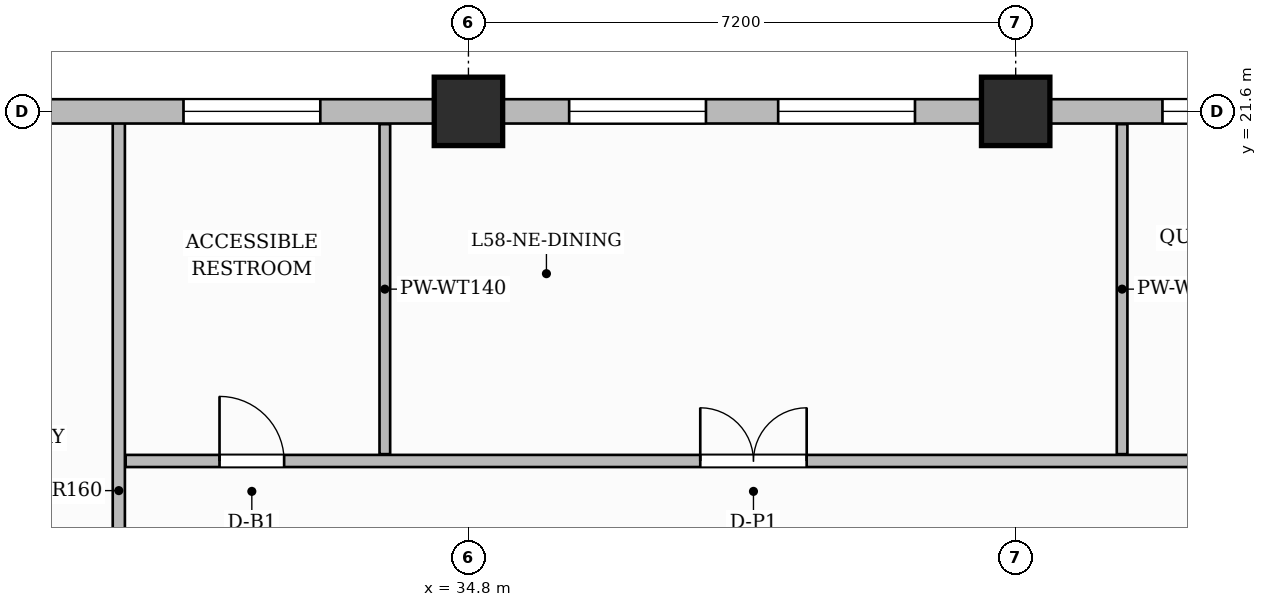
"""IFC4 building model, lengths in metres.
Left out: names, types, materials, properties, quantities, classifications, styles, units other than length and angle.
Written with IfcOpenShell. Run it as: python <this file> out.ifc"""

import sys

from ifc_helpers import new_model, si_unit, direction, frame, frame_2d, origin, origin_2d, place, context, subcontext, project, spatial, rectangle, extrude, source, transform, mapped, element, fill, save


model = new_model("IFC4")
c1 = context("Model", 3, precision=1e-05, world=origin(), true_north=direction((0.0, 1.0)))
c2 = subcontext(c1, "Body", "Model", "MODEL_VIEW")
j1 = project(units=[si_unit("LENGTHUNIT", "METRE"), si_unit("PLANEANGLEUNIT", "RADIAN")], contexts=[c1])
p1 = place(None, origin())
s1 = spatial("IfcSite", under=j1, at=p1, CompositionType="ELEMENT")
p2 = place(p1, origin())
s2 = spatial("IfcBuilding", under=s1, at=p2, CompositionType="ELEMENT")
p3 = place(p2, frame((0.0, 0.0, 232.7)))
s3 = spatial("IfcBuildingStorey", under=s2, at=p3, CompositionType="ELEMENT", Elevation=232.7)
m1 = source(origin(), c2, "Body", "SweptSolid", [
    extrude(rectangle(XDim=0.9, YDim=0.9, at=origin_2d()), origin(), (0.0, 0.0, 1.0), 3.85),
])
for number, where, z_axis, x_axis in (
    (1, (34.8, 21.6, 0.0), (0.0, 0.0, 1.0), (1.0, 0.0, 0.0)),
    (2, (42.0, 21.6, 0.0), (0.0, 0.0, 1.0), (1.0, 0.0, 0.0)),
):
    element("IfcColumn", number, at=place(p3, frame(where, z_axis=z_axis, x_axis=x_axis)), inside=s3, PredefinedType="COLUMN", context=c2, shape_type="MappedRepresentation", body=[
        mapped(m1, transform((0.0, 0.0, 0.0), scale=1.0)),
    ])
p4 = place(p3, frame((30.2, 11.76, 0.0), z_axis=(0.0, 0.0, 1.0), x_axis=(0.0, 1.0, 0.0)))
e3 = element("IfcWall", 3, at=p4, inside=s3, PredefinedType="PARTITIONING", context=c2, shape_type="SweptSolid", body=[
    extrude(rectangle(XDim=9.7, YDim=0.16, at=frame_2d((4.85, 0.0))), origin(), (0.0, 0.0, 1.0), 3.6),
])
p5 = place(p3, frame((30.29, 17.0, 0.0), z_axis=(0.0, 0.0, 1.0), x_axis=(1.0, 0.0, 0.0)))
e4 = element("IfcWall", 4, at=p5, inside=s3, PredefinedType="PARTITIONING", context=c2, shape_type="SweptSolid", body=[
    extrude(rectangle(XDim=19.37, YDim=0.16, at=frame_2d((9.685, 0.0))), origin(), (0.0, 0.0, 1.0), 3.6),
])
p6 = place(p5, frame((1.235, 0.0, 0.0)))
e5 = element("IfcOpeningElement", 5, at=p6, cuts=e4, PredefinedType="OPENING", context=c2, shape_type="SweptSolid", body=[
    extrude(rectangle(XDim=0.85, YDim=2.1, at=frame_2d((0.425, 1.05))), frame((0.0, 0.09, 0.0), z_axis=(0.0, -1.0, 0.0), x_axis=(1.0, 0.0, 0.0)), (0.0, 0.0, 1.0), 0.18),
])
p7 = place(p5, frame((7.56, 0.0, 0.0)))
e6 = element("IfcOpeningElement", 6, at=p7, cuts=e4, PredefinedType="OPENING", context=c2, shape_type="SweptSolid", body=[
    extrude(rectangle(XDim=1.4, YDim=2.35, at=frame_2d((0.7, 1.175))), frame((0.0, 0.09, 0.0), z_axis=(0.0, -1.0, 0.0), x_axis=(1.0, 0.0, 0.0)), (0.0, 0.0, 1.0), 0.18),
])
p8 = place(p5, frame((15.785, 0.0, 0.0)))
e7 = element("IfcOpeningElement", 7, at=p8, cuts=e4, PredefinedType="OPENING", context=c2, shape_type="SweptSolid", body=[
    extrude(rectangle(XDim=0.95, YDim=2.15, at=frame_2d((0.475, 1.075))), frame((0.0, 0.09, 0.0), z_axis=(0.0, -1.0, 0.0), x_axis=(1.0, 0.0, 0.0)), (0.0, 0.0, 1.0), 0.18),
])
for number, where, z_axis, x_axis in (
    (8, (33.7, 17.09, 0.0), (0.0, 0.0, 1.0), (0.0, 1.0, 0.0)),
    (9, (43.4, 17.09, 0.0), (0.0, 0.0, 1.0), (0.0, 1.0, 0.0)),
):
    element("IfcWall", number, at=place(p3, frame(where, z_axis=z_axis, x_axis=x_axis)), inside=s3, PredefinedType="PARTITIONING", context=c2, shape_type="SweptSolid", body=[
        extrude(rectangle(XDim=4.342, YDim=0.14, at=frame_2d((2.171, 0.0))), origin(), (0.0, 0.0, 1.0), 3.6),
    ])
p9 = place(p3, frame((14.4, 21.6, 0.0), z_axis=(0.0, 0.0, 1.0), x_axis=(1.0, 0.0, 0.0)))
e10 = element("IfcWall", 10, at=p9, inside=s3, PredefinedType="SOLIDWALL", context=c2, shape_type="SweptSolid", body=[
    extrude(rectangle(XDim=35.4, YDim=0.32, at=frame_2d((17.7, 0.0))), origin(), (0.0, 0.0, 1.0), 3.135),
])
p10 = place(p9, frame((0.85, 0.0, 0.0)))
e11 = element("IfcOpeningElement", 11, at=p10, cuts=e10, PredefinedType="OPENING", context=c2, shape_type="SweptSolid", body=[
    extrude(rectangle(XDim=1.2, YDim=2.2, at=frame_2d((0.6, 1.1))), frame((0.0, 0.17, 0.0), z_axis=(0.0, -1.0, 0.0), x_axis=(1.0, 0.0, 0.0)), (0.0, 0.0, 1.0), 0.34),
])
p11 = place(p9, frame((2.811, 0.0, 0.8)))
e12 = element("IfcOpeningElement", 12, at=p11, cuts=e10, PredefinedType="OPENING", context=c2, shape_type="SweptSolid", body=[
    extrude(rectangle(XDim=1.8, YDim=1.85, at=frame_2d((0.9, 0.925))), frame((0.0, 0.17, 0.0), z_axis=(0.0, -1.0, 0.0), x_axis=(1.0, 0.0, 0.0)), (0.0, 0.0, 1.0), 0.34),
])
p12 = place(p9, frame((5.269, 0.0, 0.8)))
e13 = element("IfcOpeningElement", 13, at=p12, cuts=e10, PredefinedType="OPENING", context=c2, shape_type="SweptSolid", body=[
    extrude(rectangle(XDim=0.95, YDim=1.75, at=frame_2d((0.475, 0.875))), frame((0.0, 0.17, 0.0), z_axis=(0.0, -1.0, 0.0), x_axis=(1.0, 0.0, 0.0)), (0.0, 0.0, 1.0), 0.34),
])
p13 = place(p9, frame((8.696, 0.0, 0.8)))
e14 = element("IfcOpeningElement", 14, at=p13, cuts=e10, PredefinedType="OPENING", context=c2, shape_type="SweptSolid", body=[
    extrude(rectangle(XDim=1.8, YDim=1.85, at=frame_2d((0.9, 0.925))), frame((0.0, 0.17, 0.0), z_axis=(0.0, -1.0, 0.0), x_axis=(1.0, 0.0, 0.0)), (0.0, 0.0, 1.0), 0.34),
])
p14 = place(p9, frame((11.704, 0.0, 0.8)))
e15 = element("IfcOpeningElement", 15, at=p14, cuts=e10, PredefinedType="OPENING", context=c2, shape_type="SweptSolid", body=[
    extrude(rectangle(XDim=1.4, YDim=1.85, at=frame_2d((0.7, 0.925))), frame((0.0, 0.17, 0.0), z_axis=(0.0, -1.0, 0.0), x_axis=(1.0, 0.0, 0.0)), (0.0, 0.0, 1.0), 0.34),
])
p15 = place(p9, frame((16.651, 0.0, 0.8)))
e16 = element("IfcOpeningElement", 16, at=p15, cuts=e10, PredefinedType="OPENING", context=c2, shape_type="SweptSolid", body=[
    extrude(rectangle(XDim=1.8, YDim=1.85, at=frame_2d((0.9, 0.925))), frame((0.0, 0.17, 0.0), z_axis=(0.0, -1.0, 0.0), x_axis=(1.0, 0.0, 0.0)), (0.0, 0.0, 1.0), 0.34),
])
p16 = place(p9, frame((21.725, 0.0, 0.8)))
e17 = element("IfcOpeningElement", 17, at=p16, cuts=e10, PredefinedType="OPENING", context=c2, shape_type="SweptSolid", body=[
    extrude(rectangle(XDim=1.8, YDim=1.85, at=frame_2d((0.9, 0.925))), frame((0.0, 0.17, 0.0), z_axis=(0.0, -1.0, 0.0), x_axis=(1.0, 0.0, 0.0)), (0.0, 0.0, 1.0), 0.34),
])
p17 = place(p9, frame((24.475, 0.0, 0.8)))
e18 = element("IfcOpeningElement", 18, at=p17, cuts=e10, PredefinedType="OPENING", context=c2, shape_type="SweptSolid", body=[
    extrude(rectangle(XDim=1.8, YDim=1.85, at=frame_2d((0.9, 0.925))), frame((0.0, 0.17, 0.0), z_axis=(0.0, -1.0, 0.0), x_axis=(1.0, 0.0, 0.0)), (0.0, 0.0, 1.0), 0.34),
])
p18 = place(p9, frame((29.531, 0.0, 0.8)))
e19 = element("IfcOpeningElement", 19, at=p18, cuts=e10, PredefinedType="OPENING", context=c2, shape_type="SweptSolid", body=[
    extrude(rectangle(XDim=1.8, YDim=1.85, at=frame_2d((0.9, 0.925))), frame((0.0, 0.17, 0.0), z_axis=(0.0, -1.0, 0.0), x_axis=(1.0, 0.0, 0.0)), (0.0, 0.0, 1.0), 0.34),
])
p19 = place(p9, frame((32.277, 0.0, 0.8)))
e20 = element("IfcOpeningElement", 20, at=p19, cuts=e10, PredefinedType="OPENING", context=c2, shape_type="SweptSolid", body=[
    extrude(rectangle(XDim=1.8, YDim=1.85, at=frame_2d((0.9, 0.925))), frame((0.0, 0.17, 0.0), z_axis=(0.0, -1.0, 0.0), x_axis=(1.0, 0.0, 0.0)), (0.0, 0.0, 1.0), 0.34),
])
m2 = source(origin(), c2, "Body", "SweptSolid", [
    extrude(rectangle(XDim=0.85, YDim=2.1, at=frame_2d((0.425, 1.05))), frame((0.0, 0.025, 0.0), z_axis=(0.0, -1.0, 0.0), x_axis=(1.0, 0.0, 0.0)), (0.0, 0.0, 1.0), 0.05),
])
p20 = place(p6, origin())
e21 = element("IfcDoor", 21, at=p20, inside=s3, OperationType="SINGLE_SWING_LEFT", PredefinedType="DOOR", context=c2, shape_type="MappedRepresentation", body=[
    mapped(m2, transform((0.0, 0.0, 0.0), scale=1.0)),
])
fill(e5, e21)
m3 = source(origin(), c2, "Body", "SweptSolid", [
    extrude(rectangle(XDim=1.4, YDim=2.35, at=frame_2d((0.7, 1.175))), frame((0.0, 0.025, 0.0), z_axis=(0.0, -1.0, 0.0), x_axis=(1.0, 0.0, 0.0)), (0.0, 0.0, 1.0), 0.05),
])
p21 = place(p7, origin())
e22 = element("IfcDoor", 22, at=p21, inside=s3, OperationType="DOUBLE_DOOR_SINGLE_SWING", PredefinedType="DOOR", context=c2, shape_type="MappedRepresentation", body=[
    mapped(m3, transform((0.0, 0.0, 0.0), scale=1.0)),
])
fill(e6, e22)
m4 = source(origin(), c2, "Body", "SweptSolid", [
    extrude(rectangle(XDim=1.8, YDim=1.85, at=frame_2d((0.9, 0.925))), frame((0.0, 0.03, 0.0), z_axis=(0.0, -1.0, 0.0), x_axis=(1.0, 0.0, 0.0)), (0.0, 0.0, 1.0), 0.06),
])
p22 = place(p15, origin())
e23 = element("IfcWindow", 23, at=p22, inside=s3, PartitioningType="DOUBLE_PANEL_VERTICAL", PredefinedType="WINDOW", context=c2, shape_type="MappedRepresentation", body=[
    mapped(m4, transform((0.0, 0.0, 0.0), scale=1.0)),
])
fill(e16, e23)
p23 = place(p16, origin())
e24 = element("IfcWindow", 24, at=p23, inside=s3, PartitioningType="DOUBLE_PANEL_VERTICAL", PredefinedType="WINDOW", context=c2, shape_type="MappedRepresentation", body=[
    mapped(m4, transform((0.0, 0.0, 0.0), scale=1.0)),
])
fill(e17, e24)
p24 = place(p17, origin())
e25 = element("IfcWindow", 25, at=p24, inside=s3, PartitioningType="DOUBLE_PANEL_VERTICAL", PredefinedType="WINDOW", context=c2, shape_type="MappedRepresentation", body=[
    mapped(m4, transform((0.0, 0.0, 0.0), scale=1.0)),
])
fill(e18, e25)
p25 = place(p18, origin())
e26 = element("IfcWindow", 26, at=p25, inside=s3, PartitioningType="DOUBLE_PANEL_VERTICAL", PredefinedType="WINDOW", context=c2, shape_type="MappedRepresentation", body=[
    mapped(m4, transform((0.0, 0.0, 0.0), scale=1.0)),
])
fill(e19, e26)
save(model, sys.argv[1])
